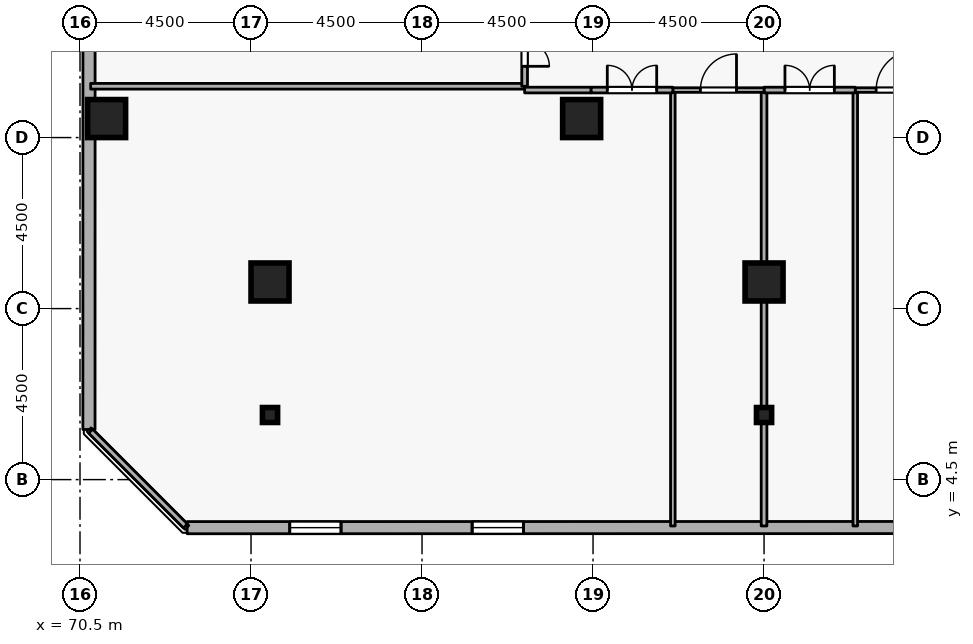
"""IFC4 building model, lengths in metres.
Left out: names, types, materials, properties, quantities, classifications, styles, units other than length and angle.
Written with IfcOpenShell. Run it as: python <this file> out.ifc"""

import sys

from ifc_helpers import new_model, si_unit, direction, frame, frame_2d, origin, origin_2d, place, context, subcontext, project, spatial, rectangle, i_section, extrude, element, fill, save


model = new_model("IFC4")
c1 = context("Model", 3, precision=1e-05, world=origin(), true_north=direction((0.0, 1.0)))
c2 = subcontext(c1, "Body", "Model", "MODEL_VIEW")
j1 = project(units=[si_unit("LENGTHUNIT", "METRE"), si_unit("PLANEANGLEUNIT", "RADIAN")], contexts=[c1])
p1 = place(None, origin())
s1 = spatial("IfcSite", under=j1, at=p1, CompositionType="ELEMENT")
p2 = place(p1, origin())
s2 = spatial("IfcBuilding", under=s1, at=p2, CompositionType="ELEMENT")
p3 = place(p2, frame((0.0, 0.0, 251.1)))
s3 = spatial("IfcBuildingStorey", under=s2, at=p3, CompositionType="ELEMENT", Elevation=251.1)
for number, where, z_axis, x_axis in (
    (1, (71.2, 14.0, 0.0), (0.0, 0.0, 1.0), (1.0, 0.0, 0.0)),
    (2, (88.5, 9.7, 0.0), (0.0, 0.0, 1.0), (1.0, 0.0, 0.0)),
    (3, (75.5, 9.7, 0.0), (0.0, 0.0, 1.0), (1.0, 0.0, 0.0)),
    (4, (83.7, 14.0, 0.0), (0.0, 0.0, 1.0), (1.0, 0.0, 0.0)),
):
    element("IfcColumn", number, at=place(p3, frame(where, z_axis=z_axis, x_axis=x_axis)), inside=s3, PredefinedType="COLUMN", context=c2, shape_type="SweptSolid", body=[
        extrude(rectangle(XDim=1.0, YDim=1.0, at=origin_2d()), origin(), (0.0, 0.0, 1.0), 3.6),
    ])
for number, where, z_axis, x_axis in (
    (5, (88.5, 6.2, 0.0), (0.0, 0.0, 1.0), (1.0, 0.0, 0.0)),
    (6, (75.5, 6.2, 0.0), (0.0, 0.0, 1.0), (1.0, 0.0, 0.0)),
):
    element("IfcColumn", number, at=place(p3, frame(where, z_axis=z_axis, x_axis=x_axis)), inside=s3, PredefinedType="COLUMN", context=c2, shape_type="SweptSolid", body=[
        extrude(i_section(OverallWidth=0.399, OverallDepth=0.394, WebThickness=0.023, FlangeThickness=0.037, FilletRadius=0.015, at=origin_2d()), origin(), (0.0, 0.0, 1.0), 3.6),
    ])
p4 = place(p3, frame((73.319, 3.235, 0.0), z_axis=(0.0, 0.0, 1.0), x_axis=(0.999999983007, 0.000184351399, 0.0)))
e7 = element("IfcWall", 7, at=p4, inside=s3, PredefinedType="STANDARD", context=c2, shape_type="SweptSolid", body=[
    extrude(rectangle(XDim=34.432, YDim=0.32, at=frame_2d((17.216, 0.0))), origin(), (0.0, 0.0, 1.0), 2.22),
])
p5 = place(p4, frame((2.7, 0.0, 0.72)))
e8 = element("IfcOpeningElement", 8, at=p5, cuts=e7, PredefinedType="OPENING", context=c2, shape_type="SweptSolid", body=[
    extrude(rectangle(XDim=1.35, YDim=1.05, at=frame_2d((0.675, 0.525))), frame((0.0, 0.17, 0.0), z_axis=(0.0, -1.0, 0.0), x_axis=(1.0, 0.0, 0.0)), (0.0, 0.0, 1.0), 0.34),
])
p6 = place(p4, frame((7.5, 0.0, 0.72)))
e9 = element("IfcOpeningElement", 9, at=p6, cuts=e7, PredefinedType="OPENING", context=c2, shape_type="SweptSolid", body=[
    extrude(rectangle(XDim=1.35, YDim=1.05, at=frame_2d((0.675, 0.525))), frame((0.0, 0.17, 0.0), z_axis=(0.0, -1.0, 0.0), x_axis=(1.0, 0.0, 0.0)), (0.0, 0.0, 1.0), 0.34),
])
p7 = place(p4, frame((21.9, 0.0, 0.72)))
e10 = element("IfcOpeningElement", 10, at=p7, cuts=e7, PredefinedType="OPENING", context=c2, shape_type="SweptSolid", body=[
    extrude(rectangle(XDim=1.35, YDim=1.05, at=frame_2d((0.675, 0.525))), frame((0.0, 0.17, 0.0), z_axis=(0.0, -1.0, 0.0), x_axis=(1.0, 0.0, 0.0)), (0.0, 0.0, 1.0), 0.34),
])
p8 = place(p4, frame((26.7, 0.0, 0.72)))
e11 = element("IfcOpeningElement", 11, at=p8, cuts=e7, PredefinedType="OPENING", context=c2, shape_type="SweptSolid", body=[
    extrude(rectangle(XDim=1.35, YDim=1.05, at=frame_2d((0.675, 0.525))), frame((0.0, 0.17, 0.0), z_axis=(0.0, -1.0, 0.0), x_axis=(1.0, 0.0, 0.0)), (0.0, 0.0, 1.0), 0.34),
])
p9 = place(p3, frame((70.742, 40.251, 0.0), z_axis=(0.0, 0.0, 1.0), x_axis=(-0.000184351399, -0.999999983007, 0.0)))
e12 = element("IfcWall", 12, at=p9, inside=s3, PredefinedType="STANDARD", context=c2, shape_type="SweptSolid", body=[
    extrude(rectangle(XDim=34.432, YDim=0.32, at=frame_2d((17.216, 0.0))), origin(), (0.0, 0.0, 1.0), 2.22),
])
p10 = place(p9, frame((7.5, 0.0, 0.72)))
e13 = element("IfcOpeningElement", 13, at=p10, cuts=e12, PredefinedType="OPENING", context=c2, shape_type="SweptSolid", body=[
    extrude(rectangle(XDim=1.35, YDim=1.05, at=frame_2d((0.675, 0.525))), frame((0.0, 0.17, 0.0), z_axis=(0.0, -1.0, 0.0), x_axis=(1.0, 0.0, 0.0)), (0.0, 0.0, 1.0), 0.34),
])
p11 = place(p9, frame((17.1, 0.0, 0.72)))
e14 = element("IfcOpeningElement", 14, at=p11, cuts=e12, PredefinedType="OPENING", context=c2, shape_type="SweptSolid", body=[
    extrude(rectangle(XDim=1.35, YDim=1.05, at=frame_2d((0.675, 0.525))), frame((0.0, 0.17, 0.0), z_axis=(0.0, -1.0, 0.0), x_axis=(1.0, 0.0, 0.0)), (0.0, 0.0, 1.0), 0.34),
])
p12 = place(p3, frame((82.2, 14.85, 0.0), z_axis=(0.0, 0.0, 1.0), x_axis=(-1.0, 0.0, 0.0)))
e15 = element("IfcWall", 15, at=p12, inside=s3, PredefinedType="PARTITIONING", context=c2, shape_type="SweptSolid", body=[
    extrude(rectangle(XDim=11.42, YDim=0.15, at=frame_2d((5.71, 0.0))), origin(), (0.0, 0.0, 1.0), 3.32),
])
p13 = place(p3, frame((82.2, 17.2, 0.0), z_axis=(0.0, 0.0, 1.0), x_axis=(0.0, -1.0, 0.0)))
e16 = element("IfcWall", 16, at=p13, inside=s3, PredefinedType="PARTITIONING", context=c2, shape_type="SweptSolid", body=[
    extrude(rectangle(XDim=2.35, YDim=0.15, at=frame_2d((1.175, 0.0))), origin(), (0.0, 0.0, 1.0), 3.32),
])
p14 = place(p13, frame((0.525, 0.0, 0.0)))
e17 = element("IfcOpeningElement", 17, at=p14, cuts=e16, PredefinedType="OPENING", context=c2, shape_type="SweptSolid", body=[
    extrude(rectangle(XDim=1.3, YDim=2.12, at=frame_2d((0.65, 1.06))), frame((0.0, 0.085, 0.0), z_axis=(0.0, -1.0, 0.0), x_axis=(1.0, 0.0, 0.0)), (0.0, 0.0, 1.0), 0.17),
])
p15 = place(p3, frame((90.9, 3.28, 0.0), z_axis=(0.0, 0.0, 1.0), x_axis=(0.0, 1.0, 0.0)))
e18 = element("IfcWall", 18, at=p15, inside=s3, PredefinedType="PARTITIONING", context=c2, shape_type="SweptSolid", body=[
    extrude(rectangle(XDim=11.47, YDim=0.12, at=frame_2d((5.735, 0.0))), origin(), (0.0, 0.0, 1.0), 3.32),
])
p16 = place(p3, frame((90.9, 14.75, 0.0), z_axis=(0.0, 0.0, 1.0), x_axis=(1.0, 0.0, 0.0)))
e19 = element("IfcWall", 19, at=p16, inside=s3, PredefinedType="PARTITIONING", context=c2, shape_type="SweptSolid", body=[
    extrude(rectangle(XDim=2.15, YDim=0.12, at=frame_2d((1.075, 0.0))), origin(), (0.0, 0.0, 1.0), 3.32),
])
p17 = place(p16, frame((0.55, 0.0, 0.0)))
e20 = element("IfcOpeningElement", 20, at=p17, cuts=e19, PredefinedType="OPENING", context=c2, shape_type="SweptSolid", body=[
    extrude(rectangle(XDim=1.05, YDim=2.1, at=frame_2d((0.525, 1.05))), frame((0.0, 0.07, 0.0), z_axis=(0.0, -1.0, 0.0), x_axis=(1.0, 0.0, 0.0)), (0.0, 0.0, 1.0), 0.14),
])
p18 = place(p3, frame((88.5, 3.28, 0.0), z_axis=(0.0, 0.0, 1.0), x_axis=(0.0, 1.0, 0.0)))
e21 = element("IfcWall", 21, at=p18, inside=s3, PredefinedType="PARTITIONING", context=c2, shape_type="SweptSolid", body=[
    extrude(rectangle(XDim=11.47, YDim=0.15, at=frame_2d((5.735, 0.0))), origin(), (0.0, 0.0, 1.0), 2.862),
])
p19 = place(p3, frame((88.5, 14.75, 0.0), z_axis=(0.0, 0.0, 1.0), x_axis=(1.0, 0.0, 0.0)))
e22 = element("IfcWall", 22, at=p19, inside=s3, PredefinedType="PARTITIONING", context=c2, shape_type="SweptSolid", body=[
    extrude(rectangle(XDim=2.4, YDim=0.15, at=frame_2d((1.2, 0.0))), origin(), (0.0, 0.0, 1.0), 3.32),
])
p20 = place(p19, frame((0.55, 0.0, 0.0)))
e23 = element("IfcOpeningElement", 23, at=p20, cuts=e22, PredefinedType="OPENING", context=c2, shape_type="SweptSolid", body=[
    extrude(rectangle(XDim=1.3, YDim=2.12, at=frame_2d((0.65, 1.06))), frame((0.0, 0.085, 0.0), z_axis=(0.0, -1.0, 0.0), x_axis=(1.0, 0.0, 0.0)), (0.0, 0.0, 1.0), 0.17),
])
p21 = place(p3, frame((86.1, 3.28, 0.0), z_axis=(0.0, 0.0, 1.0), x_axis=(0.0, 1.0, 0.0)))
e24 = element("IfcWall", 24, at=p21, inside=s3, PredefinedType="PARTITIONING", context=c2, shape_type="SweptSolid", body=[
    extrude(rectangle(XDim=11.47, YDim=0.12, at=frame_2d((5.735, 0.0))), origin(), (0.0, 0.0, 1.0), 3.32),
])
p22 = place(p3, frame((86.1, 14.75, 0.0), z_axis=(0.0, 0.0, 1.0), x_axis=(1.0, 0.0, 0.0)))
e25 = element("IfcWall", 25, at=p22, inside=s3, PredefinedType="PARTITIONING", context=c2, shape_type="SweptSolid", body=[
    extrude(rectangle(XDim=2.4, YDim=0.12, at=frame_2d((1.2, 0.0))), origin(), (0.0, 0.0, 1.0), 3.32),
])
p23 = place(p22, frame((0.725, 0.0, 0.0)))
e26 = element("IfcOpeningElement", 26, at=p23, cuts=e25, PredefinedType="OPENING", context=c2, shape_type="SweptSolid", body=[
    extrude(rectangle(XDim=0.95, YDim=2.1, at=frame_2d((0.475, 1.05))), frame((0.0, 0.07, 0.0), z_axis=(0.0, -1.0, 0.0), x_axis=(1.0, 0.0, 0.0)), (0.0, 0.0, 1.0), 0.14),
])
p24 = place(p3, frame((73.275, 3.28, 0.0), z_axis=(0.0, 0.0, 1.0), x_axis=(-0.707106781187, 0.707106781187, 0.0)))
e27 = element("IfcWall", 27, at=p24, inside=s3, PredefinedType="PARTITIONING", context=c2, shape_type="SweptSolid", body=[
    extrude(rectangle(XDim=3.528, YDim=0.15, at=frame_2d((1.764, 0.0))), origin(), (0.0, 0.0, 1.0), 3.32),
])
p25 = place(p3, frame((82.2, 14.75, 0.0), z_axis=(0.0, 0.0, 1.0), x_axis=(1.0, 0.0, 0.0)))
e28 = element("IfcWall", 28, at=p25, inside=s3, PredefinedType="PARTITIONING", context=c2, shape_type="SweptSolid", body=[
    extrude(rectangle(XDim=1.75, YDim=0.15, at=frame_2d((0.875, 0.0))), origin(), (0.0, 0.0, 1.0), 3.32),
])
p26 = place(p3, frame((83.95, 14.75, 0.0), z_axis=(0.0, 0.0, 1.0), x_axis=(1.0, 0.0, 0.0)))
e29 = element("IfcWall", 29, at=p26, inside=s3, PredefinedType="PARTITIONING", context=c2, shape_type="SweptSolid", body=[
    extrude(rectangle(XDim=2.15, YDim=0.15, at=frame_2d((1.075, 0.0))), origin(), (0.0, 0.0, 1.0), 3.32),
])
p27 = place(p26, frame((0.425, 0.0, 0.0)))
e30 = element("IfcOpeningElement", 30, at=p27, cuts=e29, PredefinedType="OPENING", context=c2, shape_type="SweptSolid", body=[
    extrude(rectangle(XDim=1.3, YDim=2.12, at=frame_2d((0.65, 1.06))), frame((0.0, 0.085, 0.0), z_axis=(0.0, -1.0, 0.0), x_axis=(1.0, 0.0, 0.0)), (0.0, 0.0, 1.0), 0.17),
])
p28 = place(p5, origin())
e31 = element("IfcWindow", 31, at=p28, inside=s3, PartitioningType="SINGLE_PANEL", PredefinedType="WINDOW", context=c2, shape_type="SweptSolid", body=[
    extrude(rectangle(XDim=1.35, YDim=1.05, at=frame_2d((0.675, 0.525))), frame((0.0, 0.03, 0.0), z_axis=(0.0, -1.0, 0.0), x_axis=(1.0, 0.0, 0.0)), (0.0, 0.0, 1.0), 0.06),
])
fill(e8, e31)
p29 = place(p6, origin())
e32 = element("IfcWindow", 32, at=p29, inside=s3, PartitioningType="SINGLE_PANEL", PredefinedType="WINDOW", context=c2, shape_type="SweptSolid", body=[
    extrude(rectangle(XDim=1.35, YDim=1.05, at=frame_2d((0.675, 0.525))), frame((0.0, 0.03, 0.0), z_axis=(0.0, -1.0, 0.0), x_axis=(1.0, 0.0, 0.0)), (0.0, 0.0, 1.0), 0.06),
])
fill(e9, e32)
p30 = place(p14, origin())
e33 = element("IfcDoor", 33, at=p30, inside=s3, OperationType="DOUBLE_DOOR_SINGLE_SWING", PredefinedType="DOOR", context=c2, shape_type="SweptSolid", body=[
    extrude(rectangle(XDim=1.3, YDim=2.12, at=frame_2d((0.65, 1.06))), frame((0.0, 0.025, 0.0), z_axis=(0.0, -1.0, 0.0), x_axis=(1.0, 0.0, 0.0)), (0.0, 0.0, 1.0), 0.05),
])
fill(e17, e33)
p31 = place(p17, origin())
e34 = element("IfcDoor", 34, at=p31, inside=s3, OperationType="SINGLE_SWING_RIGHT", PredefinedType="DOOR", context=c2, shape_type="SweptSolid", body=[
    extrude(rectangle(XDim=1.05, YDim=2.1, at=frame_2d((0.525, 1.05))), frame((0.0, 0.025, 0.0), z_axis=(0.0, -1.0, 0.0), x_axis=(1.0, 0.0, 0.0)), (0.0, 0.0, 1.0), 0.05),
])
fill(e20, e34)
p32 = place(p20, origin())
e35 = element("IfcDoor", 35, at=p32, inside=s3, OperationType="DOUBLE_DOOR_SINGLE_SWING", PredefinedType="DOOR", context=c2, shape_type="SweptSolid", body=[
    extrude(rectangle(XDim=1.3, YDim=2.12, at=frame_2d((0.65, 1.06))), frame((0.0, 0.025, 0.0), z_axis=(0.0, -1.0, 0.0), x_axis=(1.0, 0.0, 0.0)), (0.0, 0.0, 1.0), 0.05),
])
fill(e23, e35)
p33 = place(p23, origin())
e36 = element("IfcDoor", 36, at=p33, inside=s3, OperationType="SINGLE_SWING_RIGHT", PredefinedType="DOOR", context=c2, shape_type="SweptSolid", body=[
    extrude(rectangle(XDim=0.95, YDim=2.1, at=frame_2d((0.475, 1.05))), frame((0.0, 0.025, 0.0), z_axis=(0.0, -1.0, 0.0), x_axis=(1.0, 0.0, 0.0)), (0.0, 0.0, 1.0), 0.05),
])
fill(e26, e36)
p34 = place(p27, origin())
e37 = element("IfcDoor", 37, at=p34, inside=s3, OperationType="DOUBLE_DOOR_SINGLE_SWING", PredefinedType="DOOR", context=c2, shape_type="SweptSolid", body=[
    extrude(rectangle(XDim=1.3, YDim=2.12, at=frame_2d((0.65, 1.06))), frame((0.0, 0.025, 0.0), z_axis=(0.0, -1.0, 0.0), x_axis=(1.0, 0.0, 0.0)), (0.0, 0.0, 1.0), 0.05),
])
fill(e30, e37)
save(model, sys.argv[1])
